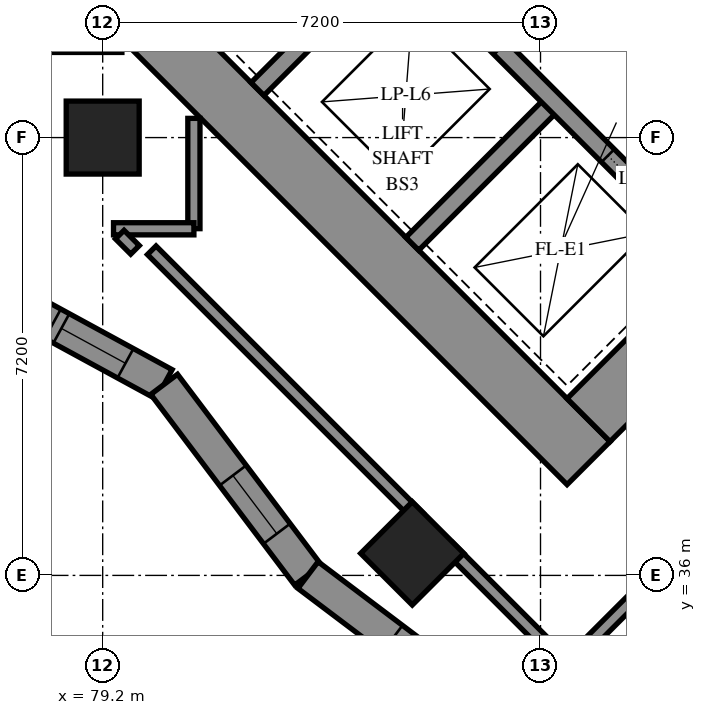
"""IFC4 building model, lengths in metres.
Left out: names, types, materials, properties, quantities, classifications, styles, units other than length and angle.
Written with IfcOpenShell. Run it as: python <this file> out.ifc"""

import sys

from ifc_helpers import new_model, si_unit, direction, frame, frame_2d, origin, origin_2d, place, context, subcontext, project, spatial, polyline, rectangle, outline, extrude, element, fill, save


model = new_model("IFC4")
c1 = context("Model", 3, precision=1e-05, world=origin(), true_north=direction((0.0, 1.0)))
c2 = subcontext(c1, "Body", "Model", "MODEL_VIEW")
j1 = project(units=[si_unit("LENGTHUNIT", "METRE"), si_unit("PLANEANGLEUNIT", "RADIAN")], contexts=[c1])
p1 = place(None, origin())
s1 = spatial("IfcSite", under=j1, at=p1, CompositionType="ELEMENT")
p2 = place(p1, origin())
s2 = spatial("IfcBuilding", under=s1, at=p2, CompositionType="ELEMENT")
p3 = place(p2, frame((0.0, 0.0, 54.2)))
s3 = spatial("IfcBuildingStorey", under=s2, at=p3, CompositionType="ELEMENT", Elevation=54.2)
for number, where, z_axis, x_axis in (
    (1, (79.2, 43.2, 0.0), (0.0, 0.0, 1.0), (1.0, 0.0, 0.0)),
    (2, (84.291, 36.362, 0.0), (0.0, 0.0, 1.0), (0.707, -0.707, 0.0)),
):
    element("IfcColumn", number, at=place(p3, frame(where, z_axis=z_axis, x_axis=x_axis)), inside=s3, PredefinedType="COLUMN", context=c2, shape_type="SweptSolid", body=[
        extrude(rectangle(XDim=1.2, YDim=1.2, at=origin_2d()), origin(), (0.0, 0.0, 1.0), 3.1),
    ])
p4 = place(p3, frame((75.594, 49.443, -0.3), z_axis=(0.0, 0.0, 1.0), x_axis=(0.7071037324, -0.70710983, 0.0)))
e3 = element("IfcWall", 3, at=p4, inside=s3, PredefinedType="SHEAR", context=c2, shape_type="SweptSolid", body=[
    extrude(rectangle(XDim=16.4, YDim=1.0, at=frame_2d((8.2, 0.0))), origin(), (0.0, 0.0, 1.0), 2.7),
])
p5 = place(p3, frame((87.19, 38.554, -0.3), z_axis=(0.0, 0.0, 1.0), x_axis=(0.707103309, 0.7071102534, 0.0)))
e4 = element("IfcWall", 4, at=p5, inside=s3, PredefinedType="SHEAR", context=c2, shape_type="SweptSolid", body=[
    extrude(rectangle(XDim=14.4, YDim=1.0, at=frame_2d((7.2, 0.0))), origin(), (0.0, 0.0, 1.0), 2.7),
])
p6 = place(p5, frame((4.55, 0.0, 0.3)))
e5 = element("IfcOpeningElement", 5, at=p6, cuts=e4, PredefinedType="OPENING", context=c2, shape_type="SweptSolid", body=[
    extrude(rectangle(XDim=1.1, YDim=2.1, at=frame_2d((0.55, 1.05))), frame((0.0, 0.51, 0.0), z_axis=(0.0, -1.0, 0.0), x_axis=(1.0, 0.0, 0.0)), (0.0, 0.0, 1.0), 1.02),
])
p7 = place(p5, frame((11.35, 0.0, 0.3)))
e6 = element("IfcOpeningElement", 6, at=p7, cuts=e4, PredefinedType="OPENING", context=c2, shape_type="SweptSolid", body=[
    extrude(rectangle(XDim=1.1, YDim=2.1, at=frame_2d((0.55, 1.05))), frame((0.0, 0.51, 0.0), z_axis=(0.0, -1.0, 0.0), x_axis=(1.0, 0.0, 0.0)), (0.0, 0.0, 1.0), 1.02),
])
for number, where, z_axis, x_axis in (
    (7, (81.746, 43.999, 0.0), (0.0, 0.0, 1.0), (0.707, 0.707, 0.0)),
    (8, (84.291, 41.453, 0.0), (0.0, 0.0, 1.0), (0.707, 0.707, 0.0)),
):
    element("IfcWall", number, at=place(p3, frame(where, z_axis=z_axis, x_axis=x_axis)), inside=s3, PredefinedType="SOLIDWALL", context=c2, shape_type="SweptSolid", body=[
        extrude(rectangle(XDim=3.3, YDim=0.3, at=frame_2d((1.65, 0.0))), origin(), (0.0, 0.0, 1.0), 3.1),
    ])
p8 = place(p3, frame((78.988, 51.423, 0.0), z_axis=(0.0, 0.0, 1.0), x_axis=(0.7071067812, -0.7071067812, 0.0)))
e9 = element("IfcWall", 9, at=p8, inside=s3, PredefinedType="SOLIDWALL", context=c2, shape_type="SweptSolid", body=[
    extrude(rectangle(XDim=14.4, YDim=0.3, at=frame_2d((7.2, 0.0))), origin(), (0.0, 0.0, 1.0), 3.1),
])
p9 = place(p8, frame((1.25, 0.0, 0.0)))
e10 = element("IfcOpeningElement", 10, at=p9, cuts=e9, PredefinedType="OPENING", context=c2, shape_type="SweptSolid", body=[
    extrude(rectangle(XDim=1.1, YDim=2.1, at=frame_2d((0.55, 1.05))), frame((0.0, 0.16, 0.0), z_axis=(0.0, -1.0, 0.0), x_axis=(1.0, 0.0, 0.0)), (0.0, 0.0, 1.0), 0.32),
])
p10 = place(p8, frame((4.85, 0.0, 0.0)))
e11 = element("IfcOpeningElement", 11, at=p10, cuts=e9, PredefinedType="OPENING", context=c2, shape_type="SweptSolid", body=[
    extrude(rectangle(XDim=1.1, YDim=2.1, at=frame_2d((0.55, 1.05))), frame((0.0, 0.16, 0.0), z_axis=(0.0, -1.0, 0.0), x_axis=(1.0, 0.0, 0.0)), (0.0, 0.0, 1.0), 0.32),
])
p11 = place(p8, frame((8.45, 0.0, 0.0)))
e12 = element("IfcOpeningElement", 12, at=p11, cuts=e9, PredefinedType="OPENING", context=c2, shape_type="SweptSolid", body=[
    extrude(rectangle(XDim=1.1, YDim=2.1, at=frame_2d((0.55, 1.05))), frame((0.0, 0.16, 0.0), z_axis=(0.0, -1.0, 0.0), x_axis=(1.0, 0.0, 0.0)), (0.0, 0.0, 1.0), 0.32),
])
p12 = place(p8, frame((12.05, 0.0, 0.0)))
e13 = element("IfcOpeningElement", 13, at=p12, cuts=e9, PredefinedType="OPENING", context=c2, shape_type="SweptSolid", body=[
    extrude(rectangle(XDim=1.1, YDim=2.1, at=frame_2d((0.55, 1.05))), frame((0.0, 0.16, 0.0), z_axis=(0.0, -1.0, 0.0), x_axis=(1.0, 0.0, 0.0)), (0.0, 0.0, 1.0), 0.32),
])
p13 = place(p3, frame((81.534, 53.969, 0.0), z_axis=(0.0, 0.0, 1.0), x_axis=(0.707103309, -0.7071102534, 0.0)))
e14 = element("IfcWall", 14, at=p13, inside=s3, PredefinedType="SOLIDWALL", context=c2, shape_type="SweptSolid", body=[
    extrude(rectangle(XDim=14.4, YDim=0.3, at=frame_2d((7.2, 0.0))), origin(), (0.0, 0.0, 1.0), 3.1),
])
p14 = place(p13, frame((12.05, 0.0, 0.0)))
e15 = element("IfcOpeningElement", 15, at=p14, cuts=e14, PredefinedType="OPENING", context=c2, shape_type="SweptSolid", body=[
    extrude(rectangle(XDim=1.1, YDim=2.1, at=frame_2d((0.55, 1.05))), frame((0.0, 0.16, 0.0), z_axis=(0.0, -1.0, 0.0), x_axis=(1.0, 0.0, 0.0)), (0.0, 0.0, 1.0), 0.32),
])
p15 = place(p3, frame((76.593, 41.111, 0.0), z_axis=(0.0, 0.0, 1.0), x_axis=(0.8783220539, -0.4780694193, 0.0)))
e16 = element("IfcWall", 16, at=p15, inside=s3, PredefinedType="SOLIDWALL", context=c2, shape_type="SweptSolid", body=[
    extrude(outline(polyline([(0.024, -0.275), (4.059, -0.275), (4.178, 0.275), (-0.024, 0.275), (0.024, -0.275)])), origin(), (0.0, 0.0, 1.0), 3.1),
])
p16 = place(p15, frame((0.835, 0.0, 0.5)))
e17 = element("IfcOpeningElement", 17, at=p16, cuts=e16, PredefinedType="OPENING", context=c2, shape_type="SweptSolid", body=[
    extrude(rectangle(XDim=1.2, YDim=2.45, at=frame_2d((0.6, 1.225))), frame((0.0, 0.285, 0.0), z_axis=(0.0, -1.0, 0.0), x_axis=(1.0, 0.0, 0.0)), (0.0, 0.0, 1.0), 0.57),
])
p17 = place(p15, frame((2.194, 0.0, 0.5)))
e18 = element("IfcOpeningElement", 18, at=p17, cuts=e16, PredefinedType="OPENING", context=c2, shape_type="SweptSolid", body=[
    extrude(rectangle(XDim=1.2, YDim=2.45, at=frame_2d((0.6, 1.225))), frame((0.0, 0.285, 0.0), z_axis=(0.0, -1.0, 0.0), x_axis=(1.0, 0.0, 0.0)), (0.0, 0.0, 1.0), 0.57),
])
p18 = place(p3, frame((80.211, 39.142, 0.0), z_axis=(0.0, 0.0, 1.0), x_axis=(0.6022049527, -0.7983415278, 0.0)))
e19 = element("IfcWall", 19, at=p18, inside=s3, PredefinedType="SOLIDWALL", context=c2, shape_type="SweptSolid", body=[
    extrude(outline(polyline([(0.059, -0.275), (3.967, -0.275), (3.89, 0.275), (-0.059, 0.275), (0.059, -0.275)])), origin(), (0.0, 0.0, 1.0), 3.1),
])
p19 = place(p18, frame((1.877, 0.0, 0.5)))
e20 = element("IfcOpeningElement", 20, at=p19, cuts=e19, PredefinedType="OPENING", context=c2, shape_type="SweptSolid", body=[
    extrude(rectangle(XDim=1.2, YDim=2.45, at=frame_2d((0.6, 1.225))), frame((0.0, 0.285, 0.0), z_axis=(0.0, -1.0, 0.0), x_axis=(1.0, 0.0, 0.0)), (0.0, 0.0, 1.0), 0.57),
])
p20 = place(p3, frame((82.577, 36.005, 0.0), z_axis=(0.0, 0.0, 1.0), x_axis=(0.7983449017, -0.6022004799, 0.0)))
e21 = element("IfcWall", 21, at=p20, inside=s3, PredefinedType="SOLIDWALL", context=c2, shape_type="SweptSolid", body=[
    extrude(outline(polyline([(-0.038, -0.275), (3.869, -0.275), (3.946, 0.275), (0.038, 0.275), (-0.038, -0.275)])), origin(), (0.0, 0.0, 1.0), 3.1),
])
p21 = place(p20, frame((1.739, 0.0, 0.5)))
e22 = element("IfcOpeningElement", 22, at=p21, cuts=e21, PredefinedType="OPENING", context=c2, shape_type="SweptSolid", body=[
    extrude(rectangle(XDim=1.2, YDim=2.45, at=frame_2d((0.6, 1.225))), frame((0.0, 0.285, 0.0), z_axis=(0.0, -1.0, 0.0), x_axis=(1.0, 0.0, 0.0)), (0.0, 0.0, 1.0), 0.57),
])
p22 = place(p3, frame((86.312, 33.293, 0.0), z_axis=(0.0, 0.0, 1.0), x_axis=(0.7071067812, 0.7071067812, 0.0)))
e23 = element("IfcWall", 23, at=p22, inside=s3, PredefinedType="PARTITIONING", context=c2, shape_type="SweptSolid", body=[
    extrude(rectangle(XDim=10.641, YDim=0.2, at=frame_2d((5.321, 0.0))), origin(), (0.0, 0.0, 1.0), 3.1),
])
p23 = place(p3, frame((86.836, 34.524, 0.0), z_axis=(0.0, 0.0, 1.0), x_axis=(0.7071067812, 0.7071067812, 0.0)))
e24 = element("IfcWall", 24, at=p23, inside=s3, PredefinedType="PARTITIONING", context=c2, shape_type="SweptSolid", body=[
    extrude(rectangle(XDim=9.399, YDim=0.2, at=frame_2d((4.699, 0.0))), origin(), (0.0, 0.0, 1.0), 3.1),
])
p24 = place(p3, frame((80.007, 41.347, 0.0), z_axis=(0.0, 0.0, 1.0), x_axis=(0.7071067812, -0.7071067812, 0.0)))
e25 = element("IfcWall", 25, at=p24, inside=s3, PredefinedType="PARTITIONING", context=c2, shape_type="SweptSolid", body=[
    extrude(rectangle(XDim=6.206, YDim=0.2, at=frame_2d((3.103, 0.0))), origin(), (0.0, 0.0, 1.0), 3.1),
])
p25 = place(p3, frame((84.889, 36.465, 0.0), z_axis=(0.0, 0.0, 1.0), x_axis=(0.7071067812, -0.7071067812, 0.0)))
e26 = element("IfcWall", 26, at=p25, inside=s3, PredefinedType="PARTITIONING", context=c2, shape_type="SweptSolid", body=[
    extrude(rectangle(XDim=2.749, YDim=0.2, at=frame_2d((1.375, 0.0))), origin(), (0.0, 0.0, 1.0), 3.1),
])
for number, where, z_axis, x_axis in (
    (27, (77.702, 44.7, 0.0), (0.0, 0.0, 1.0), (1.0, 0.0, 0.0)),
    (28, (80.7, 41.702, 0.0), (0.0, 0.0, 1.0), (0.0, 1.0, 0.0)),
):
    element("IfcWall", number, at=place(p3, frame(where, z_axis=z_axis, x_axis=x_axis)), inside=s3, PredefinedType="PARTITIONING", context=c2, shape_type="SweptSolid", body=[
        extrude(rectangle(XDim=1.814, YDim=0.2, at=frame_2d((0.907, 0.0))), origin(), (0.0, 0.0, 1.0), 3.1),
    ])
p26 = place(p3, frame((79.378, 41.7, 0.0), z_axis=(0.0, 0.0, 1.0), x_axis=(1.0, 0.0, 0.0)))
e29 = element("IfcWall", 29, at=p26, inside=s3, PredefinedType="PARTITIONING", context=c2, shape_type="SweptSolid", body=[
    extrude(rectangle(XDim=1.322, YDim=0.2, at=frame_2d((0.661, 0.0))), origin(), (0.0, 0.0, 1.0), 3.1),
])
p27 = place(p3, frame((79.481, 41.605, 0.0), z_axis=(0.0, 0.0, 1.0), x_axis=(0.7071067812, -0.7071067812, 0.0)))
e30 = element("IfcWall", 30, at=p27, inside=s3, PredefinedType="PARTITIONING", context=c2, shape_type="SweptSolid", body=[
    extrude(rectangle(XDim=0.355, YDim=0.2, at=frame_2d((0.177, 0.0))), origin(), (0.0, 0.0, 1.0), 3.1),
])
p28 = place(p16, origin())
e31 = element("IfcWindow", 31, at=p28, inside=s3, PartitioningType="SINGLE_PANEL", PredefinedType="WINDOW", context=c2, shape_type="SweptSolid", body=[
    extrude(rectangle(XDim=1.2, YDim=2.45, at=frame_2d((0.6, 1.225))), frame((0.0, 0.155, 0.0), z_axis=(0.0, -1.0, 0.0), x_axis=(1.0, 0.0, 0.0)), (0.0, 0.0, 1.0), 0.06),
])
fill(e17, e31)
p29 = place(p17, origin())
e32 = element("IfcWindow", 32, at=p29, inside=s3, PartitioningType="SINGLE_PANEL", PredefinedType="WINDOW", context=c2, shape_type="SweptSolid", body=[
    extrude(rectangle(XDim=1.2, YDim=2.45, at=frame_2d((0.6, 1.225))), frame((0.0, 0.155, 0.0), z_axis=(0.0, -1.0, 0.0), x_axis=(1.0, 0.0, 0.0)), (0.0, 0.0, 1.0), 0.06),
])
fill(e18, e32)
p30 = place(p19, origin())
e33 = element("IfcWindow", 33, at=p30, inside=s3, PartitioningType="SINGLE_PANEL", PredefinedType="WINDOW", context=c2, shape_type="SweptSolid", body=[
    extrude(rectangle(XDim=1.2, YDim=2.45, at=frame_2d((0.6, 1.225))), frame((0.0, 0.155, 0.0), z_axis=(0.0, -1.0, 0.0), x_axis=(1.0, 0.0, 0.0)), (0.0, 0.0, 1.0), 0.06),
])
fill(e20, e33)
p31 = place(p21, origin())
e34 = element("IfcWindow", 34, at=p31, inside=s3, PartitioningType="SINGLE_PANEL", PredefinedType="WINDOW", context=c2, shape_type="SweptSolid", body=[
    extrude(rectangle(XDim=1.2, YDim=2.45, at=frame_2d((0.6, 1.225))), frame((0.0, 0.155, 0.0), z_axis=(0.0, -1.0, 0.0), x_axis=(1.0, 0.0, 0.0)), (0.0, 0.0, 1.0), 0.06),
])
fill(e22, e34)
p32 = place(p12, origin())
e35 = element("IfcDoor", 35, at=p32, inside=s3, OperationType="SLIDING_TO_RIGHT", PredefinedType="DOOR", context=c2, shape_type="SweptSolid", body=[
    extrude(rectangle(XDim=1.1, YDim=2.1, at=frame_2d((0.55, 1.05))), frame((0.0, 0.025, 0.0), z_axis=(0.0, -1.0, 0.0), x_axis=(1.0, 0.0, 0.0)), (0.0, 0.0, 1.0), 0.05),
])
fill(e13, e35)
save(model, sys.argv[1])
